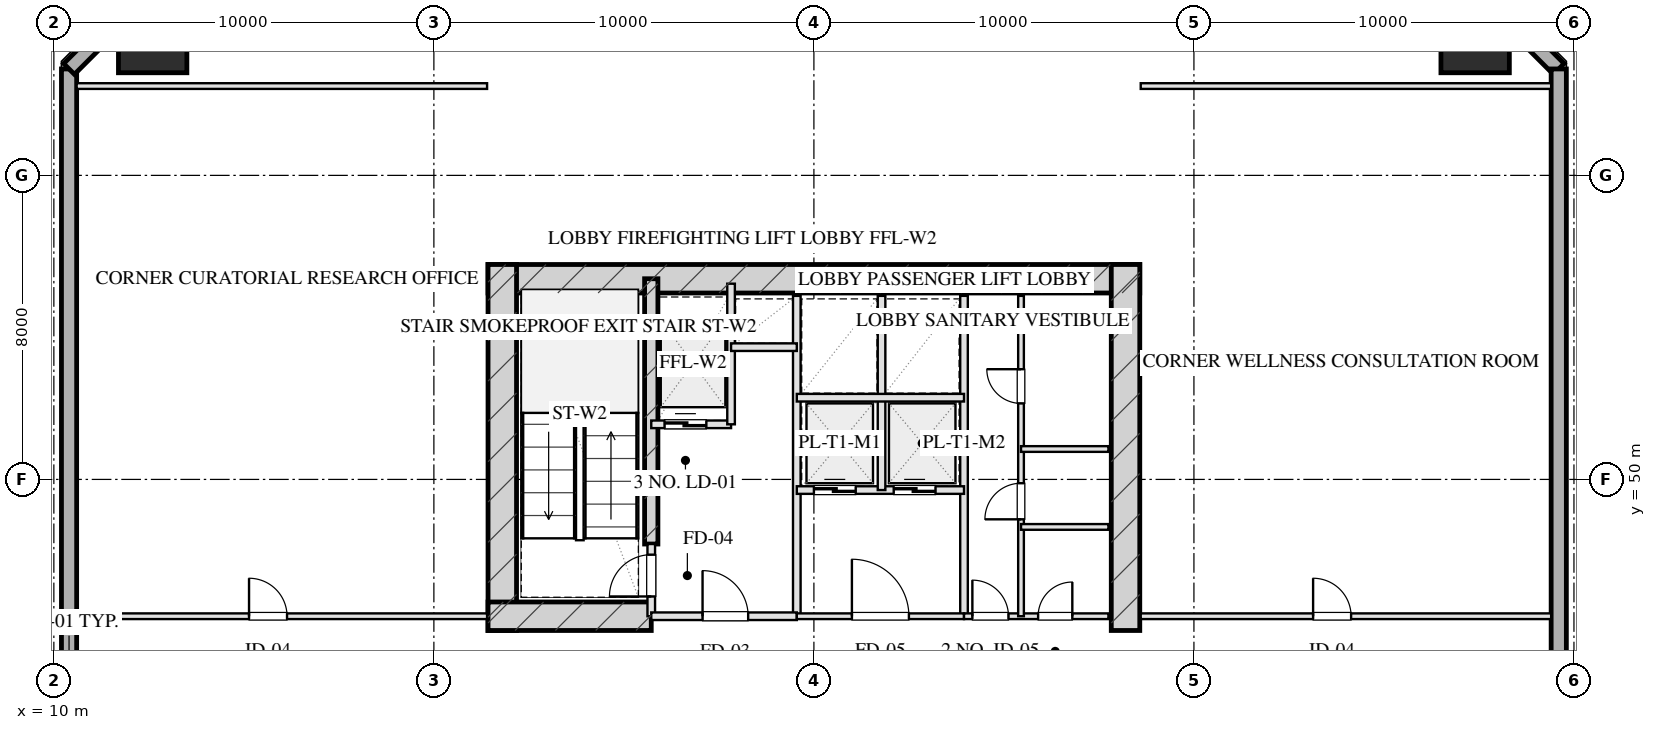
"""IFC4 building model, lengths in metres.
Left out: names, types, materials, properties, quantities, classifications, styles, units other than length and angle.
Written with IfcOpenShell. Run it as: python <this file> out.ifc"""

import sys

from ifc_helpers import new_model, si_unit, direction, frame, frame_2d, origin, origin_2d, place, context, subcontext, project, spatial, rectangle, hollow_rectangle, extrude, element, fill, save


model = new_model("IFC4")
c1 = context("Model", 3, precision=1e-05, world=origin(), true_north=direction((0.0, 1.0)))
c2 = subcontext(c1, "Body", "Model", "MODEL_VIEW")
j1 = project(units=[si_unit("LENGTHUNIT", "METRE"), si_unit("PLANEANGLEUNIT", "RADIAN")], contexts=[c1])
p1 = place(None, origin())
s1 = spatial("IfcSite", under=j1, at=p1, CompositionType="ELEMENT")
p2 = place(p1, origin())
s2 = spatial("IfcBuilding", under=s1, at=p2, CompositionType="ELEMENT")
p3 = place(p2, frame((0.0, 0.0, 38.0)))
s3 = spatial("IfcBuildingStorey", under=s2, at=p3, CompositionType="ELEMENT", Elevation=38.0)
p4 = place(p3, frame((21.425, 55.28, 0.0), z_axis=(0.0, 0.0, 1.0), x_axis=(1.0, 0.0, 0.0)))
e1 = element("IfcWall", 1, at=p4, inside=s3, PredefinedType="SHEAR", context=c2, shape_type="SweptSolid", body=[
    extrude(rectangle(XDim=17.15, YDim=0.75, at=frame_2d((8.575, 0.0))), origin(), (0.0, 0.0, 1.0), 4.0),
])
for number, where, z_axis, x_axis in (
    (2, (21.8, 46.025, 0.0), (0.0, 0.0, 1.0), (0.0, 1.0, 0.0)),
    (3, (38.2, 46.025, 0.0), (0.0, 0.0, 1.0), (0.0, 1.0, 0.0)),
):
    element("IfcWall", number, at=place(p3, frame(where, z_axis=z_axis, x_axis=x_axis)), inside=s3, PredefinedType="SHEAR", context=c2, shape_type="SweptSolid", body=[
        extrude(rectangle(XDim=9.63, YDim=0.75, at=frame_2d((4.815, 0.0))), origin(), (0.0, 0.0, 1.0), 4.0),
    ])
p5 = place(p3, frame((25.72, 48.3, 0.0), z_axis=(0.0, 0.0, 1.0), x_axis=(0.0, 1.0, 0.0)))
e4 = element("IfcWall", 4, at=p5, inside=s3, PredefinedType="SHEAR", context=c2, shape_type="SweptSolid", body=[
    extrude(rectangle(XDim=6.98, YDim=0.35, at=frame_2d((3.49, 0.0))), origin(), (0.0, 0.0, 1.0), 4.0),
])
p6 = place(p3, frame((21.425, 46.4, 0.0), z_axis=(0.0, 0.0, 1.0), x_axis=(1.0, 0.0, 0.0)))
e5 = element("IfcWall", 5, at=p6, inside=s3, PredefinedType="SHEAR", context=c2, shape_type="SweptSolid", body=[
    extrude(rectangle(XDim=4.295, YDim=0.75, at=frame_2d((2.147, 0.0))), origin(), (0.0, 0.0, 1.0), 4.0),
])
for number, where, z_axis, x_axis in (
    (6, (47.4, 61.6, 0.0), (0.0, 0.0, 1.0), (1.0, 0.0, 0.0)),
    (7, (12.6, 61.6, 0.0), (0.0, 0.0, 1.0), (1.0, 0.0, 0.0)),
):
    element("IfcColumn", number, at=place(p3, frame(where, z_axis=z_axis, x_axis=x_axis)), inside=s3, PredefinedType="COLUMN", context=c2, shape_type="SweptSolid", body=[
        extrude(hollow_rectangle(XDim=1.8, YDim=1.8, WallThickness=0.06, at=origin_2d()), origin(), (0.0, 0.0, 1.0), 4.001),
    ])
p7 = place(p3, frame((10.4, 7.2, 0.0), z_axis=(0.0, 0.0, 1.0), x_axis=(0.0, 1.0, 0.0)))
e8 = element("IfcWall", 8, at=p7, inside=s3, PredefinedType="SOLIDWALL", context=c2, shape_type="SweptSolid", body=[
    extrude(rectangle(XDim=53.6, YDim=0.4, at=frame_2d((26.8, 0.0))), origin(), (0.0, 0.0, 1.0), 3.16),
])
p8 = place(p7, frame((28.15, 0.0, 0.75)))
e9 = element("IfcOpeningElement", 9, at=p8, cuts=e8, PredefinedType="OPENING", context=c2, shape_type="SweptSolid", body=[
    extrude(rectangle(XDim=2.5, YDim=1.75, at=frame_2d((1.25, 0.875))), frame((0.0, 0.21, 0.0), z_axis=(0.0, -1.0, 0.0), x_axis=(1.0, 0.0, 0.0)), (0.0, 0.0, 1.0), 0.42),
])
p9 = place(p7, frame((20.45, 0.0, 0.0)))
e10 = element("IfcOpeningElement", 10, at=p9, cuts=e8, PredefinedType="OPENING", context=c2, shape_type="SweptSolid", body=[
    extrude(rectangle(XDim=1.1, YDim=2.15, at=frame_2d((0.55, 1.075))), frame((0.0, 0.21, 0.0), z_axis=(0.0, -1.0, 0.0), x_axis=(1.0, 0.0, 0.0)), (0.0, 0.0, 1.0), 0.42),
])
for number, where, z_axis, x_axis in (
    (11, (10.4, 60.8, 0.0), (0.0, 0.0, 1.0), (0.707, 0.707, 0.0)),
    (12, (46.6, 63.8, 0.0), (0.0, 0.0, 1.0), (0.707, -0.707, 0.0)),
):
    element("IfcWall", number, at=place(p3, frame(where, z_axis=z_axis, x_axis=x_axis)), inside=s3, PredefinedType="SOLIDWALL", context=c2, shape_type="SweptSolid", body=[
        extrude(rectangle(XDim=4.243, YDim=0.4, at=frame_2d((2.121, 0.0))), origin(), (0.0, 0.0, 1.0), 3.16),
    ])
p10 = place(p3, frame((49.6, 60.8, 0.0), z_axis=(0.0, 0.0, 1.0), x_axis=(0.0, -1.0, 0.0)))
e13 = element("IfcWall", 13, at=p10, inside=s3, PredefinedType="SOLIDWALL", context=c2, shape_type="SweptSolid", body=[
    extrude(rectangle(XDim=53.6, YDim=0.4, at=frame_2d((26.8, 0.0))), origin(), (0.0, 0.0, 1.0), 3.16),
])
p11 = place(p10, frame((19.15, 0.0, 0.75)))
e14 = element("IfcOpeningElement", 14, at=p11, cuts=e13, PredefinedType="OPENING", context=c2, shape_type="SweptSolid", body=[
    extrude(rectangle(XDim=2.5, YDim=1.75, at=frame_2d((1.25, 0.875))), frame((0.0, 0.21, 0.0), z_axis=(0.0, -1.0, 0.0), x_axis=(1.0, 0.0, 0.0)), (0.0, 0.0, 1.0), 0.42),
])
p12 = place(p10, frame((32.05, 0.0, 0.0)))
e15 = element("IfcOpeningElement", 15, at=p12, cuts=e13, PredefinedType="OPENING", context=c2, shape_type="SweptSolid", body=[
    extrude(rectangle(XDim=1.1, YDim=2.15, at=frame_2d((0.55, 1.075))), frame((0.0, 0.21, 0.0), z_axis=(0.0, -1.0, 0.0), x_axis=(1.0, 0.0, 0.0)), (0.0, 0.0, 1.0), 0.42),
])
p13 = place(p3, frame((25.72, 46.4, 0.0), z_axis=(0.0, 0.0, 1.0), x_axis=(0.0, 1.0, 0.0)))
e16 = element("IfcWall", 16, at=p13, inside=s3, PredefinedType="PARTITIONING", context=c2, shape_type="SweptSolid", body=[
    extrude(rectangle(XDim=1.9, YDim=0.2, at=frame_2d((0.95, 0.0))), origin(), (0.0, 0.0, 1.0), 3.725),
])
p14 = place(p13, frame((0.52, 0.0, 0.0)))
e17 = element("IfcOpeningElement", 17, at=p14, cuts=e16, PredefinedType="OPENING", context=c2, shape_type="SweptSolid", body=[
    extrude(rectangle(XDim=1.1, YDim=2.05, at=frame_2d((0.55, 1.025))), frame((0.0, 0.11, 0.0), z_axis=(0.0, -1.0, 0.0), x_axis=(1.0, 0.0, 0.0)), (0.0, 0.0, 1.0), 0.22),
])
p15 = place(p3, frame((29.55, 46.4, 0.0), z_axis=(0.0, 0.0, 1.0), x_axis=(0.0, 1.0, 0.0)))
e18 = element("IfcWall", 18, at=p15, inside=s3, PredefinedType="PARTITIONING", context=c2, shape_type="SweptSolid", body=[
    extrude(rectangle(XDim=8.43, YDim=0.2, at=frame_2d((4.215, 0.0))), origin(), (0.0, 0.0, 1.0), 3.725),
])
p16 = place(p3, frame((25.72, 46.4, 0.0), z_axis=(0.0, 0.0, 1.0), x_axis=(1.0, 0.0, 0.0)))
e19 = element("IfcWall", 19, at=p16, inside=s3, PredefinedType="PARTITIONING", context=c2, shape_type="SweptSolid", body=[
    extrude(rectangle(XDim=3.83, YDim=0.2, at=frame_2d((1.915, 0.0))), origin(), (0.0, 0.0, 1.0), 3.725),
])
p17 = place(p16, frame((1.35, 0.0, 0.0)))
e20 = element("IfcOpeningElement", 20, at=p17, cuts=e19, PredefinedType="OPENING", context=c2, shape_type="SweptSolid", body=[
    extrude(rectangle(XDim=1.2, YDim=2.05, at=frame_2d((0.6, 1.025))), frame((0.0, 0.11, 0.0), z_axis=(0.0, -1.0, 0.0), x_axis=(1.0, 0.0, 0.0)), (0.0, 0.0, 1.0), 0.22),
])
p18 = place(p3, frame((25.72, 51.45, 0.0), z_axis=(0.0, 0.0, 1.0), x_axis=(1.0, 0.0, 0.0)))
e21 = element("IfcWall", 21, at=p18, inside=s3, PredefinedType="PARTITIONING", context=c2, shape_type="SweptSolid", body=[
    extrude(rectangle(XDim=2.1, YDim=0.2, at=frame_2d((1.05, 0.0))), origin(), (0.0, 0.0, 1.0), 3.725),
])
p19 = place(p18, frame((0.35, 0.0, 0.0)))
e22 = element("IfcOpeningElement", 22, at=p19, cuts=e21, PredefinedType="OPENING", context=c2, shape_type="SweptSolid", body=[
    extrude(rectangle(XDim=1.1, YDim=2.05, at=frame_2d((0.55, 1.025))), frame((0.0, 0.11, 0.0), z_axis=(0.0, -1.0, 0.0), x_axis=(1.0, 0.0, 0.0)), (0.0, 0.0, 1.0), 0.22),
])
p20 = place(p3, frame((27.82, 51.45, 0.0), z_axis=(0.0, 0.0, 1.0), x_axis=(0.0, 1.0, 0.0)))
e23 = element("IfcWall", 23, at=p20, inside=s3, PredefinedType="PARTITIONING", context=c2, shape_type="SweptSolid", body=[
    extrude(rectangle(XDim=3.7, YDim=0.2, at=frame_2d((1.85, 0.0))), origin(), (0.0, 0.0, 1.0), 3.725),
])
p21 = place(p3, frame((27.82, 53.48, 0.0), z_axis=(0.0, 0.0, 1.0), x_axis=(1.0, 0.0, 0.0)))
e24 = element("IfcWall", 24, at=p21, inside=s3, PredefinedType="PARTITIONING", context=c2, shape_type="SweptSolid", body=[
    extrude(rectangle(XDim=1.73, YDim=0.2, at=frame_2d((0.865, 0.0))), origin(), (0.0, 0.0, 1.0), 3.725),
])
p22 = place(p3, frame((33.95, 46.4, 0.0), z_axis=(0.0, 0.0, 1.0), x_axis=(0.0, 1.0, 0.0)))
e25 = element("IfcWall", 25, at=p22, inside=s3, PredefinedType="PARTITIONING", context=c2, shape_type="SweptSolid", body=[
    extrude(rectangle(XDim=8.43, YDim=0.2, at=frame_2d((4.215, 0.0))), origin(), (0.0, 0.0, 1.0), 3.725),
])
p23 = place(p3, frame((29.55, 46.4, 0.0), z_axis=(0.0, 0.0, 1.0), x_axis=(1.0, 0.0, 0.0)))
e26 = element("IfcWall", 26, at=p23, inside=s3, PredefinedType="PARTITIONING", context=c2, shape_type="SweptSolid", body=[
    extrude(rectangle(XDim=4.4, YDim=0.15, at=frame_2d((2.2, 0.0))), origin(), (0.0, 0.0, 1.0), 3.725),
])
p24 = place(p23, frame((1.45, 0.0, 0.0)))
e27 = element("IfcOpeningElement", 27, at=p24, cuts=e26, PredefinedType="OPENING", context=c2, shape_type="SweptSolid", body=[
    extrude(rectangle(XDim=1.5, YDim=2.05, at=frame_2d((0.75, 1.025))), frame((0.0, 0.085, 0.0), z_axis=(0.0, -1.0, 0.0), x_axis=(1.0, 0.0, 0.0)), (0.0, 0.0, 1.0), 0.17),
])
p25 = place(p3, frame((29.55, 49.72, 0.0), z_axis=(0.0, 0.0, 1.0), x_axis=(1.0, 0.0, 0.0)))
e28 = element("IfcWall", 28, at=p25, inside=s3, PredefinedType="PARTITIONING", context=c2, shape_type="SweptSolid", body=[
    extrude(rectangle(XDim=4.4, YDim=0.2, at=frame_2d((2.2, 0.0))), origin(), (0.0, 0.0, 1.0), 3.725),
])
p26 = place(p25, frame((0.45, 0.0, 0.0)))
e29 = element("IfcOpeningElement", 29, at=p26, cuts=e28, PredefinedType="OPENING", context=c2, shape_type="SweptSolid", body=[
    extrude(rectangle(XDim=1.1, YDim=2.05, at=frame_2d((0.55, 1.025))), frame((0.0, 0.11, 0.0), z_axis=(0.0, -1.0, 0.0), x_axis=(1.0, 0.0, 0.0)), (0.0, 0.0, 1.0), 0.22),
])
p27 = place(p25, frame((2.55, 0.0, 0.0)))
e30 = element("IfcOpeningElement", 30, at=p27, cuts=e28, PredefinedType="OPENING", context=c2, shape_type="SweptSolid", body=[
    extrude(rectangle(XDim=1.1, YDim=2.05, at=frame_2d((0.55, 1.025))), frame((0.0, 0.11, 0.0), z_axis=(0.0, -1.0, 0.0), x_axis=(1.0, 0.0, 0.0)), (0.0, 0.0, 1.0), 0.22),
])
p28 = place(p3, frame((31.78, 49.72, 0.0), z_axis=(0.0, 0.0, 1.0), x_axis=(0.0, 1.0, 0.0)))
e31 = element("IfcWall", 31, at=p28, inside=s3, PredefinedType="PARTITIONING", context=c2, shape_type="SweptSolid", body=[
    extrude(rectangle(XDim=5.11, YDim=0.2, at=frame_2d((2.555, 0.0))), origin(), (0.0, 0.0, 1.0), 3.725),
])
p29 = place(p3, frame((29.55, 52.15, 0.0), z_axis=(0.0, 0.0, 1.0), x_axis=(1.0, 0.0, 0.0)))
e32 = element("IfcWall", 32, at=p29, inside=s3, PredefinedType="PARTITIONING", context=c2, shape_type="SweptSolid", body=[
    extrude(rectangle(XDim=4.4, YDim=0.2, at=frame_2d((2.2, 0.0))), origin(), (0.0, 0.0, 1.0), 3.725),
])
p30 = place(p3, frame((33.95, 46.4, 0.0), z_axis=(0.0, 0.0, 1.0), x_axis=(1.0, 0.0, 0.0)))
e33 = element("IfcWall", 33, at=p30, inside=s3, PredefinedType="PARTITIONING", context=c2, shape_type="SweptSolid", body=[
    extrude(rectangle(XDim=3.8, YDim=0.15, at=frame_2d((1.9, 0.0))), origin(), (0.0, 0.0, 1.0), 3.725),
])
p31 = place(p30, frame((0.22, 0.0, 0.0)))
e34 = element("IfcOpeningElement", 34, at=p31, cuts=e33, PredefinedType="OPENING", context=c2, shape_type="SweptSolid", body=[
    extrude(rectangle(XDim=0.95, YDim=2.05, at=frame_2d((0.475, 1.025))), frame((0.0, 0.085, 0.0), z_axis=(0.0, -1.0, 0.0), x_axis=(1.0, 0.0, 0.0)), (0.0, 0.0, 1.0), 0.17),
])
p32 = place(p30, frame((1.95, 0.0, 0.0)))
e35 = element("IfcOpeningElement", 35, at=p32, cuts=e33, PredefinedType="OPENING", context=c2, shape_type="SweptSolid", body=[
    extrude(rectangle(XDim=0.9, YDim=2.05, at=frame_2d((0.45, 1.025))), frame((0.0, 0.085, 0.0), z_axis=(0.0, -1.0, 0.0), x_axis=(1.0, 0.0, 0.0)), (0.0, 0.0, 1.0), 0.17),
])
p33 = place(p3, frame((35.45, 46.4, 0.0), z_axis=(0.0, 0.0, 1.0), x_axis=(0.0, 1.0, 0.0)))
e36 = element("IfcWall", 36, at=p33, inside=s3, PredefinedType="PARTITIONING", context=c2, shape_type="SweptSolid", body=[
    extrude(rectangle(XDim=8.43, YDim=0.15, at=frame_2d((4.215, 0.0))), origin(), (0.0, 0.0, 1.0), 3.315),
])
p34 = place(p33, frame((2.55, 0.0, 0.0)))
e37 = element("IfcOpeningElement", 37, at=p34, cuts=e36, PredefinedType="OPENING", context=c2, shape_type="SweptSolid", body=[
    extrude(rectangle(XDim=0.95, YDim=2.05, at=frame_2d((0.475, 1.025))), frame((0.0, 0.085, 0.0), z_axis=(0.0, -1.0, 0.0), x_axis=(1.0, 0.0, 0.0)), (0.0, 0.0, 1.0), 0.17),
])
p35 = place(p33, frame((5.6, 0.0, 0.0)))
e38 = element("IfcOpeningElement", 38, at=p35, cuts=e36, PredefinedType="OPENING", context=c2, shape_type="SweptSolid", body=[
    extrude(rectangle(XDim=0.9, YDim=2.05, at=frame_2d((0.45, 1.025))), frame((0.0, 0.085, 0.0), z_axis=(0.0, -1.0, 0.0), x_axis=(1.0, 0.0, 0.0)), (0.0, 0.0, 1.0), 0.17),
])
for number, where, z_axis, x_axis in (
    (39, (35.45, 50.8, 0.0), (0.0, 0.0, 1.0), (1.0, 0.0, 0.0)),
    (40, (35.45, 48.75, 0.0), (0.0, 0.0, 1.0), (1.0, 0.0, 0.0)),
):
    element("IfcWall", number, at=place(p3, frame(where, z_axis=z_axis, x_axis=x_axis)), inside=s3, PredefinedType="PARTITIONING", context=c2, shape_type="SweptSolid", body=[
        extrude(rectangle(XDim=2.3, YDim=0.15, at=frame_2d((1.15, 0.0))), origin(), (0.0, 0.0, 1.0), 3.725),
    ])
p36 = place(p3, frame((10.6, 60.35, 0.0), z_axis=(0.0, 0.0, 1.0), x_axis=(1.0, 0.0, 0.0)))
e41 = element("IfcWall", 41, at=p36, inside=s3, PredefinedType="PARTITIONING", context=c2, shape_type="SweptSolid", body=[
    extrude(rectangle(XDim=10.8, YDim=0.15, at=frame_2d((5.4, 0.0))), origin(), (0.0, 0.0, 1.0), 3.725),
])
p37 = place(p3, frame((10.6, 46.4, 0.0), z_axis=(0.0, 0.0, 1.0), x_axis=(1.0, 0.0, 0.0)))
e42 = element("IfcWall", 42, at=p37, inside=s3, PredefinedType="PARTITIONING", context=c2, shape_type="SweptSolid", body=[
    extrude(rectangle(XDim=10.8, YDim=0.15, at=frame_2d((5.4, 0.0))), origin(), (0.0, 0.0, 1.0), 3.725),
])
p38 = place(p37, frame((4.536, 0.0, 0.0)))
e43 = element("IfcOpeningElement", 43, at=p38, cuts=e42, PredefinedType="OPENING", context=c2, shape_type="SweptSolid", body=[
    extrude(rectangle(XDim=1.0, YDim=2.05, at=frame_2d((0.5, 1.025))), frame((0.0, 0.085, 0.0), z_axis=(0.0, -1.0, 0.0), x_axis=(1.0, 0.0, 0.0)), (0.0, 0.0, 1.0), 0.17),
])
p39 = place(p3, frame((38.6, 60.35, 0.0), z_axis=(0.0, 0.0, 1.0), x_axis=(1.0, 0.0, 0.0)))
e44 = element("IfcWall", 44, at=p39, inside=s3, PredefinedType="PARTITIONING", context=c2, shape_type="SweptSolid", body=[
    extrude(rectangle(XDim=10.8, YDim=0.15, at=frame_2d((5.4, 0.0))), origin(), (0.0, 0.0, 1.0), 3.725),
])
p40 = place(p3, frame((38.6, 46.4, 0.0), z_axis=(0.0, 0.0, 1.0), x_axis=(1.0, 0.0, 0.0)))
e45 = element("IfcWall", 45, at=p40, inside=s3, PredefinedType="PARTITIONING", context=c2, shape_type="SweptSolid", body=[
    extrude(rectangle(XDim=10.8, YDim=0.15, at=frame_2d((5.4, 0.0))), origin(), (0.0, 0.0, 1.0), 3.725),
])
p41 = place(p40, frame((4.536, 0.0, 0.0)))
e46 = element("IfcOpeningElement", 46, at=p41, cuts=e45, PredefinedType="OPENING", context=c2, shape_type="SweptSolid", body=[
    extrude(rectangle(XDim=1.0, YDim=2.05, at=frame_2d((0.5, 1.025))), frame((0.0, 0.085, 0.0), z_axis=(0.0, -1.0, 0.0), x_axis=(1.0, 0.0, 0.0)), (0.0, 0.0, 1.0), 0.17),
])
p42 = place(p14, origin())
e47 = element("IfcDoor", 47, at=p42, inside=s3, OperationType="SINGLE_SWING_LEFT", PredefinedType="DOOR", context=c2, shape_type="SweptSolid", body=[
    extrude(rectangle(XDim=1.1, YDim=2.05, at=frame_2d((0.55, 1.025))), frame((0.0, 0.025, 0.0), z_axis=(0.0, -1.0, 0.0), x_axis=(1.0, 0.0, 0.0)), (0.0, 0.0, 1.0), 0.05),
])
fill(e17, e47)
p43 = place(p17, origin())
e48 = element("IfcDoor", 48, at=p43, inside=s3, OperationType="SINGLE_SWING_LEFT", PredefinedType="DOOR", context=c2, shape_type="SweptSolid", body=[
    extrude(rectangle(XDim=1.2, YDim=2.05, at=frame_2d((0.6, 1.025))), frame((0.0, 0.025, 0.0), z_axis=(0.0, -1.0, 0.0), x_axis=(1.0, 0.0, 0.0)), (0.0, 0.0, 1.0), 0.05),
])
fill(e20, e48)
p44 = place(p19, origin())
e49 = element("IfcDoor", 49, at=p44, inside=s3, OperationType="DOUBLE_DOOR_SLIDING", PredefinedType="DOOR", context=c2, shape_type="SweptSolid", body=[
    extrude(rectangle(XDim=1.1, YDim=2.05, at=frame_2d((0.55, 1.025))), frame((0.0, 0.025, 0.0), z_axis=(0.0, -1.0, 0.0), x_axis=(1.0, 0.0, 0.0)), (0.0, 0.0, 1.0), 0.05),
])
fill(e22, e49)
p45 = place(p24, origin())
e50 = element("IfcDoor", 50, at=p45, inside=s3, OperationType="SINGLE_SWING_LEFT", PredefinedType="DOOR", context=c2, shape_type="SweptSolid", body=[
    extrude(rectangle(XDim=1.5, YDim=2.05, at=frame_2d((0.75, 1.025))), frame((0.0, 0.025, 0.0), z_axis=(0.0, -1.0, 0.0), x_axis=(1.0, 0.0, 0.0)), (0.0, 0.0, 1.0), 0.05),
])
fill(e27, e50)
p46 = place(p26, origin())
e51 = element("IfcDoor", 51, at=p46, inside=s3, OperationType="DOUBLE_DOOR_SLIDING", PredefinedType="DOOR", context=c2, shape_type="SweptSolid", body=[
    extrude(rectangle(XDim=1.1, YDim=2.05, at=frame_2d((0.55, 1.025))), frame((0.0, 0.025, 0.0), z_axis=(0.0, -1.0, 0.0), x_axis=(1.0, 0.0, 0.0)), (0.0, 0.0, 1.0), 0.05),
])
fill(e29, e51)
p47 = place(p27, origin())
e52 = element("IfcDoor", 52, at=p47, inside=s3, OperationType="DOUBLE_DOOR_SLIDING", PredefinedType="DOOR", context=c2, shape_type="SweptSolid", body=[
    extrude(rectangle(XDim=1.1, YDim=2.05, at=frame_2d((0.55, 1.025))), frame((0.0, 0.025, 0.0), z_axis=(0.0, -1.0, 0.0), x_axis=(1.0, 0.0, 0.0)), (0.0, 0.0, 1.0), 0.05),
])
fill(e30, e52)
p48 = place(p31, origin())
e53 = element("IfcDoor", 53, at=p48, inside=s3, OperationType="SINGLE_SWING_LEFT", PredefinedType="DOOR", context=c2, shape_type="SweptSolid", body=[
    extrude(rectangle(XDim=0.95, YDim=2.05, at=frame_2d((0.475, 1.025))), frame((0.0, 0.025, 0.0), z_axis=(0.0, -1.0, 0.0), x_axis=(1.0, 0.0, 0.0)), (0.0, 0.0, 1.0), 0.05),
])
fill(e34, e53)
p49 = place(p32, origin())
e54 = element("IfcDoor", 54, at=p49, inside=s3, OperationType="SINGLE_SWING_RIGHT", PredefinedType="DOOR", context=c2, shape_type="SweptSolid", body=[
    extrude(rectangle(XDim=0.9, YDim=2.05, at=frame_2d((0.45, 1.025))), frame((0.0, 0.025, 0.0), z_axis=(0.0, -1.0, 0.0), x_axis=(1.0, 0.0, 0.0)), (0.0, 0.0, 1.0), 0.05),
])
fill(e35, e54)
p50 = place(p34, origin())
e55 = element("IfcDoor", 55, at=p50, inside=s3, OperationType="SINGLE_SWING_LEFT", PredefinedType="DOOR", context=c2, shape_type="SweptSolid", body=[
    extrude(rectangle(XDim=0.95, YDim=2.05, at=frame_2d((0.475, 1.025))), frame((0.0, 0.025, 0.0), z_axis=(0.0, -1.0, 0.0), x_axis=(1.0, 0.0, 0.0)), (0.0, 0.0, 1.0), 0.05),
])
fill(e37, e55)
p51 = place(p35, origin())
e56 = element("IfcDoor", 56, at=p51, inside=s3, OperationType="SINGLE_SWING_RIGHT", PredefinedType="DOOR", context=c2, shape_type="SweptSolid", body=[
    extrude(rectangle(XDim=0.9, YDim=2.05, at=frame_2d((0.45, 1.025))), frame((0.0, 0.025, 0.0), z_axis=(0.0, -1.0, 0.0), x_axis=(1.0, 0.0, 0.0)), (0.0, 0.0, 1.0), 0.05),
])
fill(e38, e56)
p52 = place(p38, origin())
e57 = element("IfcDoor", 57, at=p52, inside=s3, OperationType="SINGLE_SWING_LEFT", PredefinedType="DOOR", context=c2, shape_type="SweptSolid", body=[
    extrude(rectangle(XDim=1.0, YDim=2.05, at=frame_2d((0.5, 1.025))), frame((0.0, 0.025, 0.0), z_axis=(0.0, -1.0, 0.0), x_axis=(1.0, 0.0, 0.0)), (0.0, 0.0, 1.0), 0.05),
])
fill(e43, e57)
p53 = place(p41, origin())
e58 = element("IfcDoor", 58, at=p53, inside=s3, OperationType="SINGLE_SWING_LEFT", PredefinedType="DOOR", context=c2, shape_type="SweptSolid", body=[
    extrude(rectangle(XDim=1.0, YDim=2.05, at=frame_2d((0.5, 1.025))), frame((0.0, 0.025, 0.0), z_axis=(0.0, -1.0, 0.0), x_axis=(1.0, 0.0, 0.0)), (0.0, 0.0, 1.0), 0.05),
])
fill(e46, e58)
save(model, sys.argv[1])
